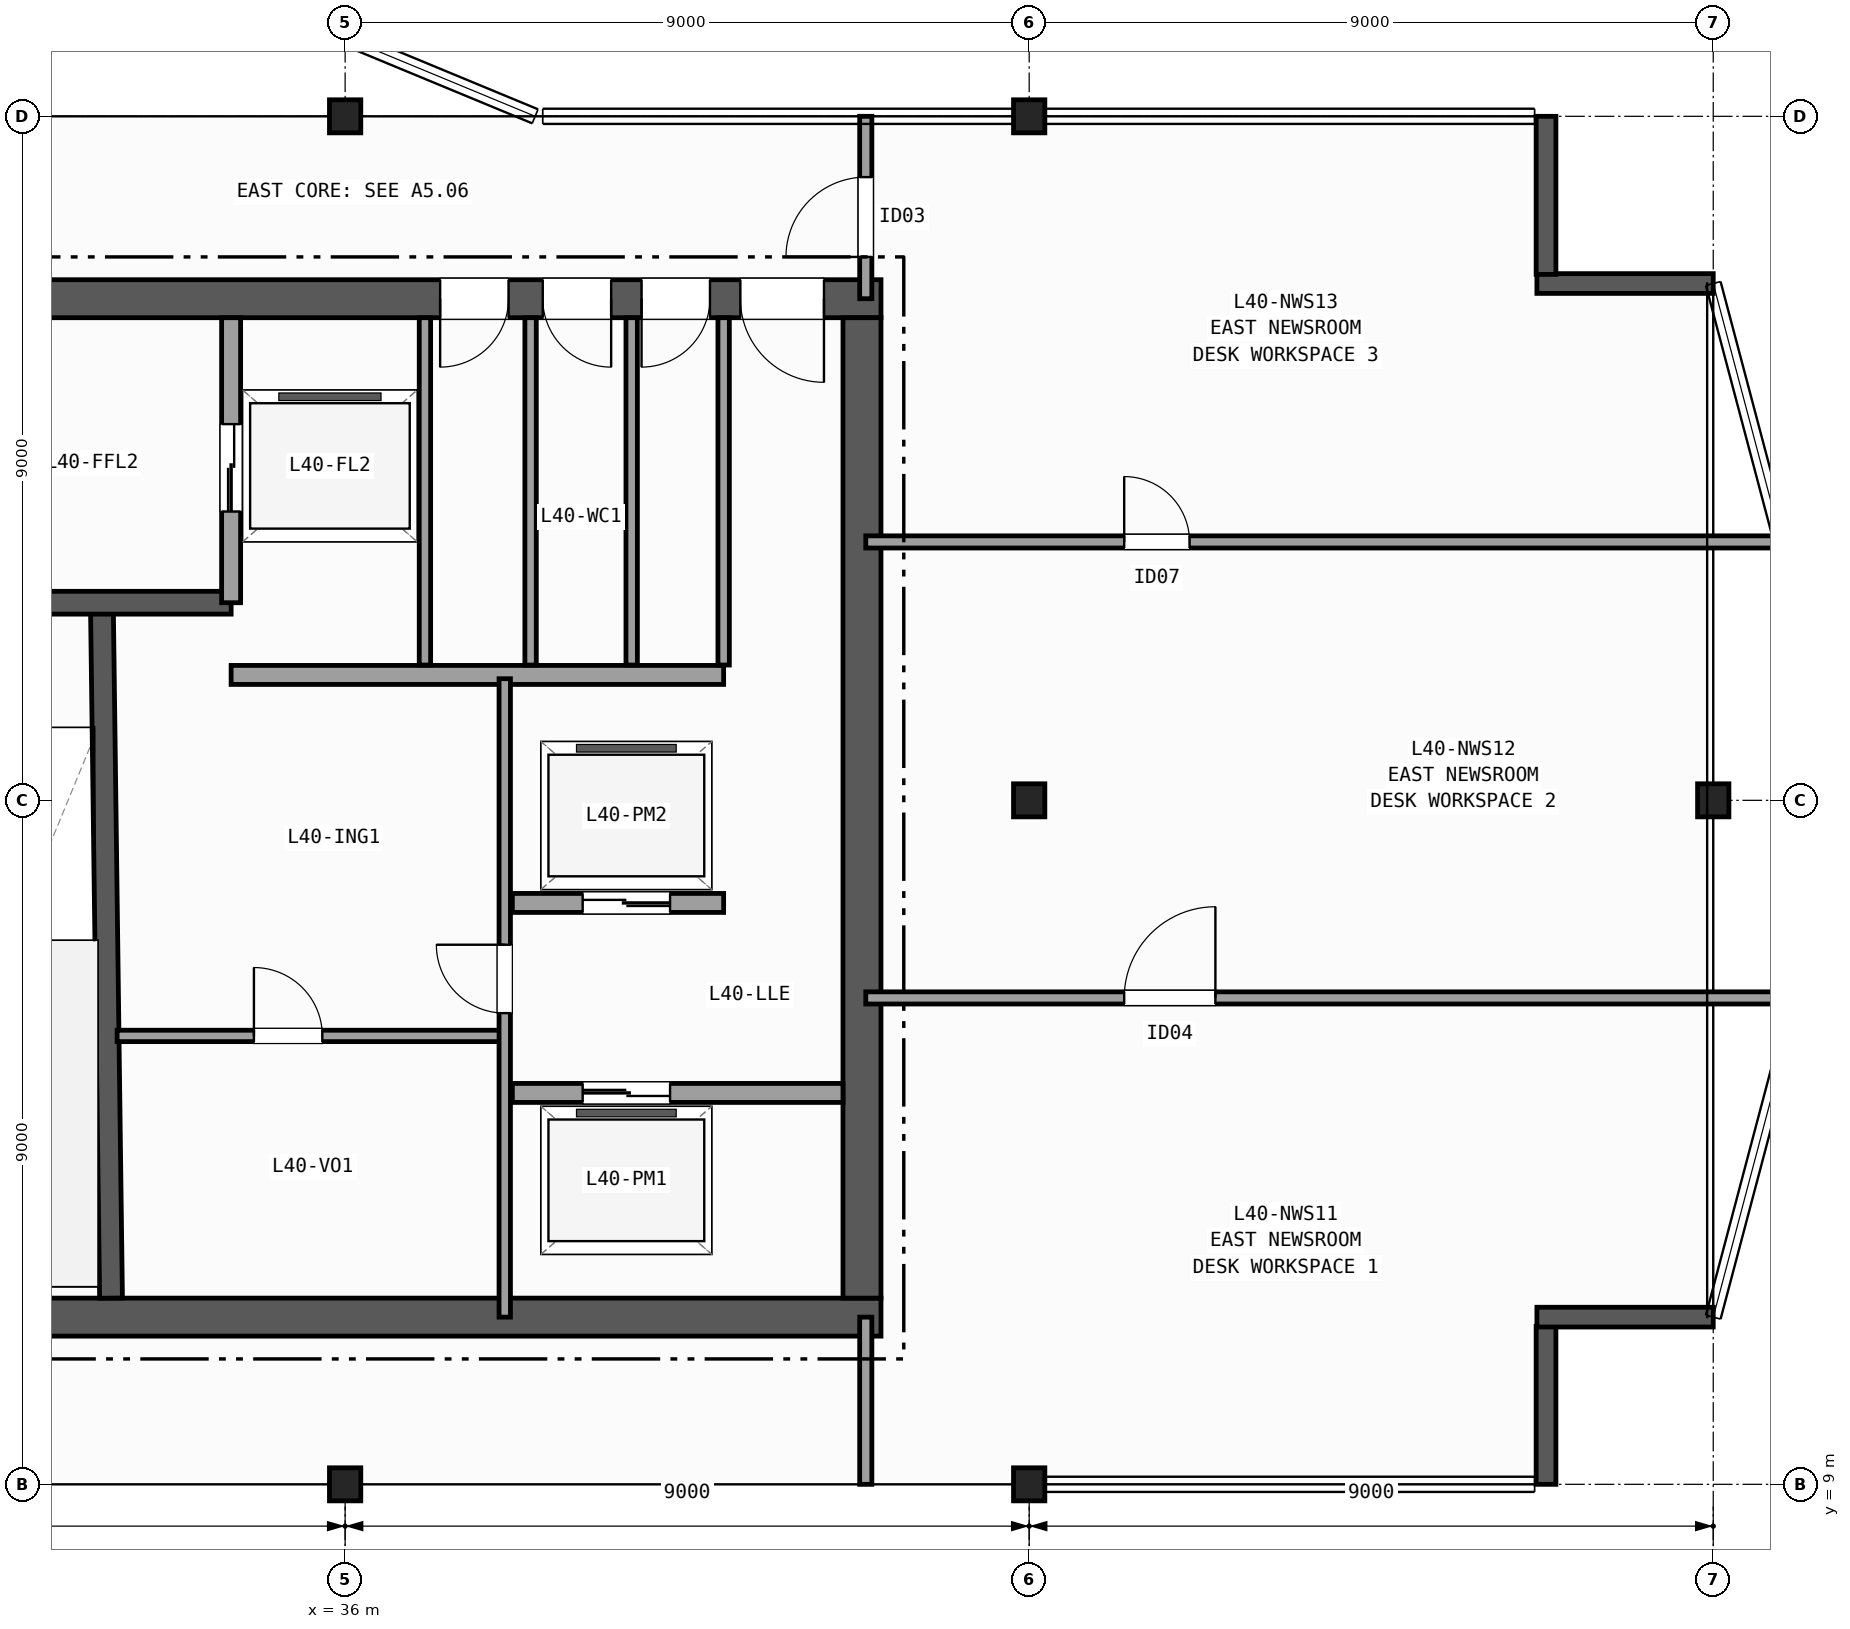
"""IFC4 building model, lengths in metres.
Left out: names, types, materials, properties, quantities, classifications, styles, units other than length and angle.
Written with IfcOpenShell. Run it as: python <this file> out.ifc"""

import sys

from ifc_helpers import new_model, si_unit, direction, frame, frame_2d, origin, origin_2d, place, context, subcontext, project, spatial, rectangle, i_section, extrude, element, fill, save


model = new_model("IFC4")
c1 = context("Model", 3, precision=1e-05, world=origin(), true_north=direction((0.0, 1.0)))
c2 = subcontext(c1, "Body", "Model", "MODEL_VIEW")
j1 = project(units=[si_unit("LENGTHUNIT", "METRE"), si_unit("PLANEANGLEUNIT", "RADIAN")], contexts=[c1])
p1 = place(None, origin())
s1 = spatial("IfcSite", under=j1, at=p1, CompositionType="ELEMENT")
p2 = place(p1, origin())
s2 = spatial("IfcBuilding", under=s1, at=p2, CompositionType="ELEMENT")
p3 = place(p2, frame((0.0, 0.0, 161.8)))
s3 = spatial("IfcBuildingStorey", under=s2, at=p3, CompositionType="ELEMENT", Elevation=161.8)
for number, where, z_axis, x_axis in (
    (1, (36.0, 9.0, 0.0), (0.0, 0.0, 1.0), (1.0, 0.0, 0.0)),
    (2, (36.0, 27.0, 0.0), (0.0, 0.0, 1.0), (1.0, 0.0, 0.0)),
    (3, (45.0, 9.0, 0.0), (0.0, 0.0, 1.0), (1.0, 0.0, 0.0)),
    (4, (45.0, 18.0, 0.0), (0.0, 0.0, 1.0), (1.0, 0.0, 0.0)),
    (5, (45.0, 27.0, 0.0), (0.0, 0.0, 1.0), (1.0, 0.0, 0.0)),
    (6, (54.0, 18.0, 0.0), (0.0, 0.0, 1.0), (1.0, 0.0, 0.0)),
):
    element("IfcColumn", number, at=place(p3, frame(where, z_axis=z_axis, x_axis=x_axis)), inside=s3, PredefinedType="COLUMN", context=c2, shape_type="SweptSolid", body=[
        extrude(i_section(OverallWidth=0.412, OverallDepth=0.435, WebThickness=0.036, FlangeThickness=0.057, FilletRadius=0.015, at=origin_2d()), origin(), (0.0, 0.0, 1.0), 3.7),
    ])
p4 = place(p3, frame((51.8, 9.0, 0.0), z_axis=(0.0, 0.0, 1.0), x_axis=(0.0, 1.0, 0.0)))
e7 = element("IfcWall", 7, at=p4, inside=s3, PredefinedType="SOLIDWALL", context=c2, shape_type="SweptSolid", body=[
    extrude(rectangle(XDim=2.08, YDim=0.26, at=frame_2d((1.04, 0.0))), origin(), (0.0, 0.0, 1.0), 3.42),
])
for number, where, z_axis, x_axis in (
    (8, (51.68, 11.2, 0.0), (0.0, 0.0, 1.0), (1.0, 0.0, 0.0)),
    (9, (54.0, 24.8, 0.0), (0.0, 0.0, 1.0), (-1.0, 0.0, 0.0)),
):
    element("IfcWall", number, at=place(p3, frame(where, z_axis=z_axis, x_axis=x_axis)), inside=s3, PredefinedType="SOLIDWALL", context=c2, shape_type="SweptSolid", body=[
        extrude(rectangle(XDim=2.32, YDim=0.26, at=frame_2d((1.16, 0.0))), origin(), (0.0, 0.0, 1.0), 3.42),
    ])
p5 = place(p3, frame((51.8, 24.92, 0.0), z_axis=(0.0, 0.0, 1.0), x_axis=(0.0, 1.0, 0.0)))
e10 = element("IfcWall", 10, at=p5, inside=s3, PredefinedType="SOLIDWALL", context=c2, shape_type="SweptSolid", body=[
    extrude(rectangle(XDim=2.08, YDim=0.26, at=frame_2d((1.04, 0.0))), origin(), (0.0, 0.0, 1.0), 3.42),
])
p6 = place(p3, frame((29.15, 11.2, 0.0), z_axis=(0.0, 0.0, 1.0), x_axis=(1.0, 0.0, 0.0)))
e11 = element("IfcWall", 11, at=p6, inside=s3, PredefinedType="SHEAR", context=c2, shape_type="SweptSolid", body=[
    extrude(rectangle(XDim=13.9, YDim=0.5, at=frame_2d((6.95, 0.0))), origin(), (0.0, 0.0, 1.0), 3.42),
])
p7 = place(p3, frame((43.05, 24.6, 0.0), z_axis=(0.0, 0.0, 1.0), x_axis=(-1.0, 0.0, 0.0)))
e12 = element("IfcWall", 12, at=p7, inside=s3, PredefinedType="SHEAR", context=c2, shape_type="SweptSolid", body=[
    extrude(rectangle(XDim=13.9, YDim=0.5, at=frame_2d((6.95, 0.0))), origin(), (0.0, 0.0, 1.0), 3.42),
])
p8 = place(p7, frame((0.75, 0.0, 0.0)))
e13 = element("IfcOpeningElement", 13, at=p8, cuts=e12, PredefinedType="OPENING", context=c2, shape_type="SweptSolid", body=[
    extrude(rectangle(XDim=1.1, YDim=2.15, at=frame_2d((0.55, 1.075))), frame((0.0, 0.26, 0.0), z_axis=(0.0, -1.0, 0.0), x_axis=(1.0, 0.0, 0.0)), (0.0, 0.0, 1.0), 0.52),
])
p9 = place(p7, frame((2.25, 0.0, 0.0)))
e14 = element("IfcOpeningElement", 14, at=p9, cuts=e12, PredefinedType="OPENING", context=c2, shape_type="SweptSolid", body=[
    extrude(rectangle(XDim=0.9, YDim=2.1, at=frame_2d((0.45, 1.05))), frame((0.0, 0.26, 0.0), z_axis=(0.0, -1.0, 0.0), x_axis=(1.0, 0.0, 0.0)), (0.0, 0.0, 1.0), 0.52),
])
p10 = place(p7, frame((3.55, 0.0, 0.0)))
e15 = element("IfcOpeningElement", 15, at=p10, cuts=e12, PredefinedType="OPENING", context=c2, shape_type="SweptSolid", body=[
    extrude(rectangle(XDim=0.9, YDim=2.1, at=frame_2d((0.45, 1.05))), frame((0.0, 0.26, 0.0), z_axis=(0.0, -1.0, 0.0), x_axis=(1.0, 0.0, 0.0)), (0.0, 0.0, 1.0), 0.52),
])
p11 = place(p7, frame((4.9, 0.0, 0.0)))
e16 = element("IfcOpeningElement", 16, at=p11, cuts=e12, PredefinedType="OPENING", context=c2, shape_type="SweptSolid", body=[
    extrude(rectangle(XDim=0.9, YDim=2.1, at=frame_2d((0.45, 1.05))), frame((0.0, 0.26, 0.0), z_axis=(0.0, -1.0, 0.0), x_axis=(1.0, 0.0, 0.0)), (0.0, 0.0, 1.0), 0.52),
])
p12 = place(p3, frame((42.8, 11.45, 0.0), z_axis=(0.0, 0.0, 1.0), x_axis=(0.0, 1.0, 0.0)))
e17 = element("IfcWall", 17, at=p12, inside=s3, PredefinedType="SHEAR", context=c2, shape_type="SweptSolid", body=[
    extrude(rectangle(XDim=12.9, YDim=0.5, at=frame_2d((6.45, 0.0))), origin(), (0.0, 0.0, 1.0), 3.42),
])
p13 = place(p3, frame((32.92, 11.45, 0.0), z_axis=(0.0, 0.0, 1.0), x_axis=(-0.013171578211, 0.999913251001, 0.0)))
e18 = element("IfcWall", 18, at=p13, inside=s3, PredefinedType="SHEAR", context=c2, shape_type="SweptSolid", body=[
    extrude(rectangle(XDim=9.101, YDim=0.3, at=frame_2d((4.55, 0.0))), origin(), (0.0, 0.0, 1.0), 3.42),
])
p14 = place(p3, frame((34.5, 20.6, 0.0), z_axis=(0.0, 0.0, 1.0), x_axis=(-1.0, 0.0, 0.0)))
e19 = element("IfcWall", 19, at=p14, inside=s3, PredefinedType="SHEAR", context=c2, shape_type="SweptSolid", body=[
    extrude(rectangle(XDim=4.85, YDim=0.3, at=frame_2d((2.425, 0.0))), origin(), (0.0, 0.0, 1.0), 3.42),
])
p15 = place(p14, frame((2.7, 0.0, 0.0)))
e20 = element("IfcOpeningElement", 20, at=p15, cuts=e19, PredefinedType="OPENING", context=c2, shape_type="SweptSolid", body=[
    extrude(rectangle(XDim=1.2, YDim=2.15, at=frame_2d((0.6, 1.075))), frame((0.0, 0.16, 0.0), z_axis=(0.0, -1.0, 0.0), x_axis=(1.0, 0.0, 0.0)), (0.0, 0.0, 1.0), 0.32),
])
p16 = place(p3, frame((34.5, 20.6, 0.0), z_axis=(0.0, 0.0, 1.0), x_axis=(0.0, 1.0, 0.0)))
e21 = element("IfcWall", 21, at=p16, inside=s3, PredefinedType="PARTITIONING", context=c2, shape_type="SweptSolid", body=[
    extrude(rectangle(XDim=3.75, YDim=0.25, at=frame_2d((1.875, 0.0))), origin(), (0.0, 0.0, 1.0), 3.42),
])
p17 = place(p16, frame((1.2, 0.0, 0.0)))
e22 = element("IfcOpeningElement", 22, at=p17, cuts=e21, PredefinedType="OPENING", context=c2, shape_type="SweptSolid", body=[
    extrude(rectangle(XDim=1.15, YDim=2.15, at=frame_2d((0.575, 1.075))), frame((0.0, 0.135, 0.0), z_axis=(0.0, -1.0, 0.0), x_axis=(1.0, 0.0, 0.0)), (0.0, 0.0, 1.0), 0.27),
])
p18 = place(p3, frame((34.5, 19.65, 0.0), z_axis=(0.0, 0.0, 1.0), x_axis=(1.0, 0.0, 0.0)))
e23 = element("IfcWall", 23, at=p18, inside=s3, PredefinedType="PARTITIONING", context=c2, shape_type="SweptSolid", body=[
    extrude(rectangle(XDim=6.48, YDim=0.25, at=frame_2d((3.24, 0.0))), origin(), (0.0, 0.0, 1.0), 3.42),
])
p19 = place(p3, frame((38.2, 14.15, 0.0), z_axis=(0.0, 0.0, 1.0), x_axis=(1.0, 0.0, 0.0)))
e24 = element("IfcWall", 24, at=p19, inside=s3, PredefinedType="PARTITIONING", context=c2, shape_type="SweptSolid", body=[
    extrude(rectangle(XDim=4.35, YDim=0.25, at=frame_2d((2.175, 0.0))), origin(), (0.0, 0.0, 1.0), 3.42),
])
p20 = place(p19, frame((0.925, 0.0, 0.0)))
e25 = element("IfcOpeningElement", 25, at=p20, cuts=e24, PredefinedType="OPENING", context=c2, shape_type="SweptSolid", body=[
    extrude(rectangle(XDim=1.15, YDim=2.15, at=frame_2d((0.575, 1.075))), frame((0.0, 0.135, 0.0), z_axis=(0.0, -1.0, 0.0), x_axis=(1.0, 0.0, 0.0)), (0.0, 0.0, 1.0), 0.27),
])
p21 = place(p3, frame((40.98, 16.65, 0.0), z_axis=(0.0, 0.0, 1.0), x_axis=(-1.0, 0.0, 0.0)))
e26 = element("IfcWall", 26, at=p21, inside=s3, PredefinedType="PARTITIONING", context=c2, shape_type="SweptSolid", body=[
    extrude(rectangle(XDim=2.78, YDim=0.25, at=frame_2d((1.39, 0.0))), origin(), (0.0, 0.0, 1.0), 3.42),
])
p22 = place(p21, frame((0.705, 0.0, 0.0)))
e27 = element("IfcOpeningElement", 27, at=p22, cuts=e26, PredefinedType="OPENING", context=c2, shape_type="SweptSolid", body=[
    extrude(rectangle(XDim=1.15, YDim=2.15, at=frame_2d((0.575, 1.075))), frame((0.0, 0.135, 0.0), z_axis=(0.0, -1.0, 0.0), x_axis=(1.0, 0.0, 0.0)), (0.0, 0.0, 1.0), 0.27),
])
p23 = place(p3, frame((33.0, 14.9, 0.0), z_axis=(0.0, 0.0, 1.0), x_axis=(1.0, 0.0, 0.0)))
e28 = element("IfcWall", 28, at=p23, inside=s3, PredefinedType="PARTITIONING", context=c2, shape_type="SweptSolid", body=[
    extrude(rectangle(XDim=5.1, YDim=0.15, at=frame_2d((2.55, 0.0))), origin(), (0.0, 0.0, 1.0), 3.42),
])
p24 = place(p23, frame((1.8, 0.0, 0.0)))
e29 = element("IfcOpeningElement", 29, at=p24, cuts=e28, PredefinedType="OPENING", context=c2, shape_type="SweptSolid", body=[
    extrude(rectangle(XDim=0.9, YDim=2.1, at=frame_2d((0.45, 1.05))), frame((0.0, 0.085, 0.0), z_axis=(0.0, -1.0, 0.0), x_axis=(1.0, 0.0, 0.0)), (0.0, 0.0, 1.0), 0.17),
])
p25 = place(p3, frame((38.1, 11.2, 0.0), z_axis=(0.0, 0.0, 1.0), x_axis=(0.0, 1.0, 0.0)))
e30 = element("IfcWall", 30, at=p25, inside=s3, PredefinedType="PARTITIONING", context=c2, shape_type="SweptSolid", body=[
    extrude(rectangle(XDim=8.4, YDim=0.15, at=frame_2d((4.2, 0.0))), origin(), (0.0, 0.0, 1.0), 3.42),
])
p26 = place(p25, frame((4.0, 0.0, 0.0)))
e31 = element("IfcOpeningElement", 31, at=p26, cuts=e30, PredefinedType="OPENING", context=c2, shape_type="SweptSolid", body=[
    extrude(rectangle(XDim=0.9, YDim=2.1, at=frame_2d((0.45, 1.05))), frame((0.0, 0.085, 0.0), z_axis=(0.0, -1.0, 0.0), x_axis=(1.0, 0.0, 0.0)), (0.0, 0.0, 1.0), 0.17),
])
for number, where, z_axis, x_axis in (
    (32, (37.05, 19.78, 0.0), (0.0, 0.0, 1.0), (0.0, 1.0, 0.0)),
    (33, (38.44, 19.78, 0.0), (0.0, 0.0, 1.0), (0.0, 1.0, 0.0)),
    (34, (39.77, 19.78, 0.0), (0.0, 0.0, 1.0), (0.0, 1.0, 0.0)),
    (35, (40.98, 19.78, 0.0), (0.0, 0.0, 1.0), (0.0, 1.0, 0.0)),
):
    element("IfcWall", number, at=place(p3, frame(where, z_axis=z_axis, x_axis=x_axis)), inside=s3, PredefinedType="PARTITIONING", context=c2, shape_type="SweptSolid", body=[
        extrude(rectangle(XDim=4.57, YDim=0.15, at=frame_2d((2.285, 0.0))), origin(), (0.0, 0.0, 1.0), 3.42),
    ])
p27 = place(p3, frame((42.85, 9.0, 0.0), z_axis=(0.0, 0.0, 1.0), x_axis=(0.0, 1.0, 0.0)))
e36 = element("IfcWall", 36, at=p27, inside=s3, PredefinedType="PARTITIONING", context=c2, shape_type="SweptSolid", body=[
    extrude(rectangle(XDim=2.2, YDim=0.16, at=frame_2d((1.1, 0.0))), origin(), (0.0, 0.0, 1.0), 2.634),
])
p28 = place(p3, frame((42.85, 24.6, 0.0), z_axis=(0.0, 0.0, 1.0), x_axis=(0.0, 1.0, 0.0)))
e37 = element("IfcWall", 37, at=p28, inside=s3, PredefinedType="PARTITIONING", context=c2, shape_type="SweptSolid", body=[
    extrude(rectangle(XDim=2.4, YDim=0.16, at=frame_2d((1.2, 0.0))), origin(), (0.0, 0.0, 1.0), 2.634),
])
p29 = place(p28, frame((0.55, 0.0, 0.0)))
e38 = element("IfcOpeningElement", 38, at=p29, cuts=e37, PredefinedType="OPENING", context=c2, shape_type="SweptSolid", body=[
    extrude(rectangle(XDim=1.05, YDim=2.15, at=frame_2d((0.525, 1.075))), frame((0.0, 0.09, 0.0), z_axis=(0.0, -1.0, 0.0), x_axis=(1.0, 0.0, 0.0)), (0.0, 0.0, 1.0), 0.18),
])
p30 = place(p3, frame((42.85, 15.4, 0.0), z_axis=(0.0, 0.0, 1.0), x_axis=(1.0, 0.0, 0.0)))
e39 = element("IfcWall", 39, at=p30, inside=s3, PredefinedType="PARTITIONING", context=c2, shape_type="SweptSolid", body=[
    extrude(rectangle(XDim=12.262, YDim=0.16, at=frame_2d((6.131, 0.0))), origin(), (0.0, 0.0, 1.0), 3.42),
])
p31 = place(p30, frame((3.4, 0.0, 0.0)))
e40 = element("IfcOpeningElement", 40, at=p31, cuts=e39, PredefinedType="OPENING", context=c2, shape_type="SweptSolid", body=[
    extrude(rectangle(XDim=1.2, YDim=2.15, at=frame_2d((0.6, 1.075))), frame((0.0, 0.09, 0.0), z_axis=(0.0, -1.0, 0.0), x_axis=(1.0, 0.0, 0.0)), (0.0, 0.0, 1.0), 0.18),
])
p32 = place(p3, frame((42.85, 21.4, 0.0), z_axis=(0.0, 0.0, 1.0), x_axis=(1.0, 0.0, 0.0)))
e41 = element("IfcWall", 41, at=p32, inside=s3, PredefinedType="PARTITIONING", context=c2, shape_type="SweptSolid", body=[
    extrude(rectangle(XDim=12.05, YDim=0.16, at=frame_2d((6.025, 0.0))), origin(), (0.0, 0.0, 1.0), 3.42),
])
p33 = place(p32, frame((3.4, 0.0, 0.0)))
e42 = element("IfcOpeningElement", 42, at=p33, cuts=e41, PredefinedType="OPENING", context=c2, shape_type="SweptSolid", body=[
    extrude(rectangle(XDim=0.86, YDim=2.05, at=frame_2d((0.43, 1.025))), frame((0.0, 0.09, 0.0), z_axis=(0.0, -1.0, 0.0), x_axis=(1.0, 0.0, 0.0)), (0.0, 0.0, 1.0), 0.18),
])
p34 = place(p8, origin())
e43 = element("IfcDoor", 43, at=p34, inside=s3, OperationType="SINGLE_SWING_LEFT", PredefinedType="DOOR", context=c2, shape_type="SweptSolid", body=[
    extrude(rectangle(XDim=1.1, YDim=2.15, at=frame_2d((0.55, 1.075))), frame((0.0, 0.025, 0.0), z_axis=(0.0, -1.0, 0.0), x_axis=(1.0, 0.0, 0.0)), (0.0, 0.0, 1.0), 0.05),
])
fill(e13, e43)
p35 = place(p9, origin())
e44 = element("IfcDoor", 44, at=p35, inside=s3, OperationType="SINGLE_SWING_RIGHT", PredefinedType="DOOR", context=c2, shape_type="SweptSolid", body=[
    extrude(rectangle(XDim=0.9, YDim=2.1, at=frame_2d((0.45, 1.05))), frame((0.0, 0.025, 0.0), z_axis=(0.0, -1.0, 0.0), x_axis=(1.0, 0.0, 0.0)), (0.0, 0.0, 1.0), 0.05),
])
fill(e14, e44)
p36 = place(p10, origin())
e45 = element("IfcDoor", 45, at=p36, inside=s3, OperationType="SINGLE_SWING_LEFT", PredefinedType="DOOR", context=c2, shape_type="SweptSolid", body=[
    extrude(rectangle(XDim=0.9, YDim=2.1, at=frame_2d((0.45, 1.05))), frame((0.0, 0.025, 0.0), z_axis=(0.0, -1.0, 0.0), x_axis=(1.0, 0.0, 0.0)), (0.0, 0.0, 1.0), 0.05),
])
fill(e15, e45)
p37 = place(p11, origin())
e46 = element("IfcDoor", 46, at=p37, inside=s3, OperationType="SINGLE_SWING_RIGHT", PredefinedType="DOOR", context=c2, shape_type="SweptSolid", body=[
    extrude(rectangle(XDim=0.9, YDim=2.1, at=frame_2d((0.45, 1.05))), frame((0.0, 0.025, 0.0), z_axis=(0.0, -1.0, 0.0), x_axis=(1.0, 0.0, 0.0)), (0.0, 0.0, 1.0), 0.05),
])
fill(e16, e46)
p38 = place(p17, origin())
e47 = element("IfcDoor", 47, at=p38, inside=s3, OperationType="DOUBLE_DOOR_SLIDING", PredefinedType="DOOR", context=c2, shape_type="SweptSolid", body=[
    extrude(rectangle(XDim=1.15, YDim=2.15, at=frame_2d((0.575, 1.075))), frame((0.0, 0.025, 0.0), z_axis=(0.0, -1.0, 0.0), x_axis=(1.0, 0.0, 0.0)), (0.0, 0.0, 1.0), 0.05),
])
fill(e22, e47)
p39 = place(p20, origin())
e48 = element("IfcDoor", 48, at=p39, inside=s3, OperationType="DOUBLE_DOOR_SLIDING", PredefinedType="DOOR", context=c2, shape_type="SweptSolid", body=[
    extrude(rectangle(XDim=1.15, YDim=2.15, at=frame_2d((0.575, 1.075))), frame((0.0, 0.025, 0.0), z_axis=(0.0, -1.0, 0.0), x_axis=(1.0, 0.0, 0.0)), (0.0, 0.0, 1.0), 0.05),
])
fill(e25, e48)
p40 = place(p22, origin())
e49 = element("IfcDoor", 49, at=p40, inside=s3, OperationType="DOUBLE_DOOR_SLIDING", PredefinedType="DOOR", context=c2, shape_type="SweptSolid", body=[
    extrude(rectangle(XDim=1.15, YDim=2.15, at=frame_2d((0.575, 1.075))), frame((0.0, 0.025, 0.0), z_axis=(0.0, -1.0, 0.0), x_axis=(1.0, 0.0, 0.0)), (0.0, 0.0, 1.0), 0.05),
])
fill(e27, e49)
p41 = place(p26, origin())
e50 = element("IfcDoor", 50, at=p41, inside=s3, OperationType="SINGLE_SWING_RIGHT", PredefinedType="DOOR", context=c2, shape_type="SweptSolid", body=[
    extrude(rectangle(XDim=0.9, YDim=2.1, at=frame_2d((0.45, 1.05))), frame((0.0, 0.025, 0.0), z_axis=(0.0, -1.0, 0.0), x_axis=(1.0, 0.0, 0.0)), (0.0, 0.0, 1.0), 0.05),
])
fill(e31, e50)
p42 = place(p24, origin())
e51 = element("IfcDoor", 51, at=p42, inside=s3, OperationType="SINGLE_SWING_LEFT", PredefinedType="DOOR", context=c2, shape_type="SweptSolid", body=[
    extrude(rectangle(XDim=0.9, YDim=2.1, at=frame_2d((0.45, 1.05))), frame((0.0, 0.025, 0.0), z_axis=(0.0, -1.0, 0.0), x_axis=(1.0, 0.0, 0.0)), (0.0, 0.0, 1.0), 0.05),
])
fill(e29, e51)
p43 = place(p29, origin())
e52 = element("IfcDoor", 52, at=p43, inside=s3, OperationType="SINGLE_SWING_LEFT", PredefinedType="DOOR", context=c2, shape_type="SweptSolid", body=[
    extrude(rectangle(XDim=1.05, YDim=2.15, at=frame_2d((0.525, 1.075))), frame((0.0, 0.025, 0.0), z_axis=(0.0, -1.0, 0.0), x_axis=(1.0, 0.0, 0.0)), (0.0, 0.0, 1.0), 0.05),
])
fill(e38, e52)
p44 = place(p31, origin())
e53 = element("IfcDoor", 53, at=p44, inside=s3, OperationType="SINGLE_SWING_RIGHT", PredefinedType="DOOR", context=c2, shape_type="SweptSolid", body=[
    extrude(rectangle(XDim=1.2, YDim=2.15, at=frame_2d((0.6, 1.075))), frame((0.0, 0.025, 0.0), z_axis=(0.0, -1.0, 0.0), x_axis=(1.0, 0.0, 0.0)), (0.0, 0.0, 1.0), 0.05),
])
fill(e40, e53)
p45 = place(p33, origin())
e54 = element("IfcDoor", 54, at=p45, inside=s3, OperationType="SINGLE_SWING_LEFT", PredefinedType="DOOR", context=c2, shape_type="SweptSolid", body=[
    extrude(rectangle(XDim=0.86, YDim=2.05, at=frame_2d((0.43, 1.025))), frame((0.0, 0.025, 0.0), z_axis=(0.0, -1.0, 0.0), x_axis=(1.0, 0.0, 0.0)), (0.0, 0.0, 1.0), 0.05),
])
fill(e42, e54)
save(model, sys.argv[1])
